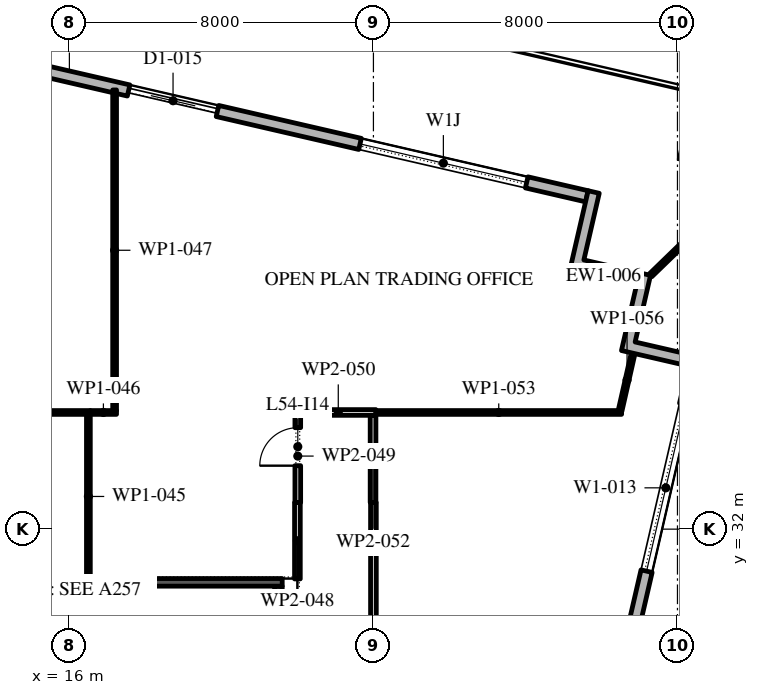
"""IFC4 building model, lengths in metres.
Left out: names, types, materials, properties, quantities, classifications, styles, units other than length and angle.
Written with IfcOpenShell. Run it as: python <this file> out.ifc"""

import sys

from ifc_helpers import new_model, si_unit, direction, frame, frame_2d, origin, place, context, subcontext, project, spatial, polyline, rectangle, outline, extrude, element, fill, save


model = new_model("IFC4")
c1 = context("Model", 3, precision=1e-05, world=origin(), true_north=direction((0.0, 1.0)))
c2 = subcontext(c1, "Body", "Model", "MODEL_VIEW")
j1 = project(units=[si_unit("LENGTHUNIT", "METRE"), si_unit("PLANEANGLEUNIT", "RADIAN")], contexts=[c1])
p1 = place(None, origin())
s1 = spatial("IfcSite", under=j1, at=p1, CompositionType="ELEMENT")
p2 = place(p1, origin())
s2 = spatial("IfcBuilding", under=s1, at=p2, CompositionType="ELEMENT")
p3 = place(p2, frame((0.0, 0.0, 251.4)))
s3 = spatial("IfcBuildingStorey", under=s2, at=p3, CompositionType="ELEMENT", Elevation=251.4)
p4 = place(p3, frame((21.359, -11.678, 0.0), z_axis=(0.0, 0.0, 1.0), x_axis=(0.224949198343, 0.974370493275, 0.0)))
e1 = element("IfcWall", 1, at=p4, inside=s3, PredefinedType="STANDARD", context=c2, shape_type="SweptSolid", body=[
    extrude(rectangle(XDim=49.5, YDim=0.3, at=frame_2d((24.75, 0.0))), origin(), (0.0, 0.0, 1.0), 4.0),
])
p5 = place(p4, frame((1.157, 0.0, 0.45)))
e2 = element("IfcOpeningElement", 2, at=p5, cuts=e1, PredefinedType="OPENING", context=c2, shape_type="SweptSolid", body=[
    extrude(rectangle(XDim=4.5, YDim=3.05, at=frame_2d((2.25, 1.525))), frame((0.0, 0.16, 0.0), z_axis=(0.0, -1.0, 0.0), x_axis=(1.0, 0.0, 0.0)), (0.0, 0.0, 1.0), 0.32),
])
p6 = place(p4, frame((8.121, 0.0, 0.45)))
e3 = element("IfcOpeningElement", 3, at=p6, cuts=e1, PredefinedType="OPENING", context=c2, shape_type="SweptSolid", body=[
    extrude(rectangle(XDim=4.5, YDim=3.05, at=frame_2d((2.25, 1.525))), frame((0.0, 0.16, 0.0), z_axis=(0.0, -1.0, 0.0), x_axis=(1.0, 0.0, 0.0)), (0.0, 0.0, 1.0), 0.32),
])
p7 = place(p4, frame((15.236, 0.0, 0.45)))
e4 = element("IfcOpeningElement", 4, at=p7, cuts=e1, PredefinedType="OPENING", context=c2, shape_type="SweptSolid", body=[
    extrude(rectangle(XDim=4.5, YDim=3.05, at=frame_2d((2.25, 1.525))), frame((0.0, 0.16, 0.0), z_axis=(0.0, -1.0, 0.0), x_axis=(1.0, 0.0, 0.0)), (0.0, 0.0, 1.0), 0.32),
])
p8 = place(p4, frame((22.35, 0.0, 0.45)))
e5 = element("IfcOpeningElement", 5, at=p8, cuts=e1, PredefinedType="OPENING", context=c2, shape_type="SweptSolid", body=[
    extrude(rectangle(XDim=4.5, YDim=3.05, at=frame_2d((2.25, 1.525))), frame((0.0, 0.16, 0.0), z_axis=(0.0, -1.0, 0.0), x_axis=(1.0, 0.0, 0.0)), (0.0, 0.0, 1.0), 0.32),
])
p9 = place(p4, frame((29.464, 0.0, 0.45)))
e6 = element("IfcOpeningElement", 6, at=p9, cuts=e1, PredefinedType="OPENING", context=c2, shape_type="SweptSolid", body=[
    extrude(rectangle(XDim=4.5, YDim=2.95, at=frame_2d((2.25, 1.475))), frame((0.0, 0.16, 0.0), z_axis=(0.0, -1.0, 0.0), x_axis=(1.0, 0.0, 0.0)), (0.0, 0.0, 1.0), 0.32),
])
p10 = place(p4, frame((37.628, 0.0, 0.0)))
e7 = element("IfcOpeningElement", 7, at=p10, cuts=e1, PredefinedType="OPENING", context=c2, shape_type="SweptSolid", body=[
    extrude(rectangle(XDim=2.4, YDim=3.325, at=frame_2d((1.2, 1.663))), frame((0.0, 0.16, 0.0), z_axis=(0.0, -1.0, 0.0), x_axis=(1.0, 0.0, 0.0)), (0.0, 0.0, 1.0), 0.32),
])
p11 = place(p4, frame((43.693, 0.0, 0.45)))
e8 = element("IfcOpeningElement", 8, at=p11, cuts=e1, PredefinedType="OPENING", context=c2, shape_type="SweptSolid", body=[
    extrude(rectangle(XDim=4.5, YDim=3.05, at=frame_2d((2.25, 1.525))), frame((0.0, 0.16, 0.0), z_axis=(0.0, -1.0, 0.0), x_axis=(1.0, 0.0, 0.0)), (0.0, 0.0, 1.0), 0.32),
])
p12 = place(p3, frame((29.616, 40.758, 0.0), z_axis=(0.0, 0.0, 1.0), x_axis=(-0.974370532314, 0.224949029246, 0.0)))
e9 = element("IfcWall", 9, at=p12, inside=s3, PredefinedType="STANDARD", context=c2, shape_type="SweptSolid", body=[
    extrude(rectangle(XDim=48.0, YDim=0.3, at=frame_2d((24.0, 0.0))), origin(), (0.0, 0.0, 1.0), 4.0),
])
p13 = place(p12, frame((1.625, 0.0, 0.45)))
e10 = element("IfcOpeningElement", 10, at=p13, cuts=e9, PredefinedType="OPENING", context=c2, shape_type="SweptSolid", body=[
    extrude(rectangle(XDim=4.5, YDim=2.675, at=frame_2d((2.25, 1.337))), frame((0.0, 0.16, 0.0), z_axis=(0.0, -1.0, 0.0), x_axis=(1.0, 0.0, 0.0)), (0.0, 0.0, 1.0), 0.32),
])
p14 = place(p12, frame((9.975, 0.0, 0.0)))
e11 = element("IfcOpeningElement", 11, at=p14, cuts=e9, PredefinedType="OPENING", context=c2, shape_type="SweptSolid", body=[
    extrude(rectangle(XDim=2.4, YDim=3.5, at=frame_2d((1.2, 1.75))), frame((0.0, 0.16, 0.0), z_axis=(0.0, -1.0, 0.0), x_axis=(1.0, 0.0, 0.0)), (0.0, 0.0, 1.0), 0.32),
])
p15 = place(p12, frame((17.575, 0.0, 0.45)))
e12 = element("IfcOpeningElement", 12, at=p15, cuts=e9, PredefinedType="OPENING", context=c2, shape_type="SweptSolid", body=[
    extrude(rectangle(XDim=4.5, YDim=2.525, at=frame_2d((2.25, 1.262))), frame((0.0, 0.16, 0.0), z_axis=(0.0, -1.0, 0.0), x_axis=(1.0, 0.0, 0.0)), (0.0, 0.0, 1.0), 0.32),
])
p16 = place(p12, frame((25.625, 0.0, 0.45)))
e13 = element("IfcOpeningElement", 13, at=p16, cuts=e9, PredefinedType="OPENING", context=c2, shape_type="SweptSolid", body=[
    extrude(rectangle(XDim=4.5, YDim=2.45, at=frame_2d((2.25, 1.225))), frame((0.0, 0.16, 0.0), z_axis=(0.0, -1.0, 0.0), x_axis=(1.0, 0.0, 0.0)), (0.0, 0.0, 1.0), 0.32),
])
p17 = place(p12, frame((33.675, 0.0, 0.45)))
e14 = element("IfcOpeningElement", 14, at=p17, cuts=e9, PredefinedType="OPENING", context=c2, shape_type="SweptSolid", body=[
    extrude(rectangle(XDim=4.5, YDim=2.45, at=frame_2d((2.25, 1.225))), frame((0.0, 0.16, 0.0), z_axis=(0.0, -1.0, 0.0), x_axis=(1.0, 0.0, 0.0)), (0.0, 0.0, 1.0), 0.32),
])
p18 = place(p12, frame((42.775, 0.0, 0.0)))
e15 = element("IfcOpeningElement", 15, at=p18, cuts=e9, PredefinedType="OPENING", context=c2, shape_type="SweptSolid", body=[
    extrude(rectangle(XDim=2.4, YDim=3.5, at=frame_2d((1.2, 1.75))), frame((0.0, 0.16, 0.0), z_axis=(0.0, -1.0, 0.0), x_axis=(1.0, 0.0, 0.0)), (0.0, 0.0, 1.0), 0.32),
])
p19 = place(p3, origin())
e16 = element("IfcWall", 16, at=p19, inside=s3, PredefinedType="STANDARD", context=c2, shape_type="SweptSolid", body=[
    extrude(outline(polyline([(30.931, 38.453), (29.177, 38.858), (29.65, 40.905), (29.942, 40.837), (29.537, 39.083), (31.291, 38.678), (30.886, 36.924), (32.348, 36.587), (32.28, 36.295), (30.526, 36.699), (30.931, 38.453)])), origin(), (0.0, 0.0, 1.0), 4.0),
])
p20 = place(p3, frame((31.291, 38.678, -0.05), z_axis=(0.0, 0.0, 1.0), x_axis=(0.718212839418, 0.695823481419, 0.0)))
e17 = element("IfcWall", 17, at=p20, inside=s3, PredefinedType="STANDARD", context=c2, shape_type="SweptSolid", body=[
    extrude(rectangle(XDim=3.62, YDim=0.1, at=frame_2d((1.81, 0.0))), origin(), (0.0, 0.0, 1.0), 4.05),
])
p21 = place(p3, frame((21.5, 25.75, 0.0), z_axis=(0.0, 0.0, 1.0), x_axis=(0.0, 1.0, 0.0)))
e18 = element("IfcWall", 18, at=p21, inside=s3, PredefinedType="SHEAR", context=c2, shape_type="SweptSolid", body=[
    extrude(rectangle(XDim=4.75, YDim=0.2, at=frame_2d((2.375, 0.0))), origin(), (0.0, 0.0, 1.0), 4.0),
])
p22 = place(p3, frame((10.4, 30.6, 0.0), z_axis=(0.0, 0.0, 1.0), x_axis=(1.0, 0.0, 0.0)))
e19 = element("IfcWall", 19, at=p22, inside=s3, PredefinedType="SHEAR", context=c2, shape_type="SweptSolid", body=[
    extrude(rectangle(XDim=11.2, YDim=0.2, at=frame_2d((5.6, 0.0))), origin(), (0.0, 0.0, 1.0), 4.0),
])
p23 = place(p3, frame((10.065, 35.07, 0.0), z_axis=(0.0, 0.0, 1.0), x_axis=(1.0, 0.0, 0.0)))
e20 = element("IfcWall", 20, at=p23, inside=s3, PredefinedType="PARTITIONING", context=c2, shape_type="SweptSolid", body=[
    extrude(rectangle(XDim=6.485, YDim=0.1, at=frame_2d((3.243, 0.0))), origin(), (0.0, 0.0, 1.0), 4.0),
])
p24 = place(p3, frame((16.5, 35.02, 0.0), z_axis=(0.0, 0.0, 1.0), x_axis=(0.0, -1.0, 0.0)))
e21 = element("IfcWall", 21, at=p24, inside=s3, PredefinedType="PARTITIONING", context=c2, shape_type="SweptSolid", body=[
    extrude(rectangle(XDim=4.32, YDim=0.1, at=frame_2d((2.16, 0.0))), origin(), (0.0, 0.0, 1.0), 4.0),
])
p25 = place(p3, frame((17.24, 35.07, 0.0), z_axis=(0.0, 0.0, 1.0), x_axis=(-1.0, 0.0, 0.0)))
e22 = element("IfcWall", 22, at=p25, inside=s3, PredefinedType="PARTITIONING", context=c2, shape_type="SweptSolid", body=[
    extrude(rectangle(XDim=0.69, YDim=0.1, at=frame_2d((0.345, 0.0))), origin(), (0.0, 0.0, 1.0), 4.0),
])
p26 = place(p3, frame((17.19, 43.556, 0.0), z_axis=(0.0, 0.0, 1.0), x_axis=(0.0, -1.0, 0.0)))
e23 = element("IfcWall", 23, at=p26, inside=s3, PredefinedType="PARTITIONING", context=c2, shape_type="SweptSolid", body=[
    extrude(rectangle(XDim=8.436, YDim=0.1, at=frame_2d((4.218, 0.0))), origin(), (0.0, 0.0, 1.0), 4.0),
])
p27 = place(p3, frame((22.0, 30.69, 0.0), z_axis=(0.0, 0.0, 1.0), x_axis=(0.0, 1.0, 0.0)))
e24 = element("IfcWall", 24, at=p27, inside=s3, PredefinedType="PARTITIONING", context=c2, shape_type="SweptSolid", body=[
    extrude(rectangle(XDim=2.01, YDim=0.15, at=frame_2d((1.005, 0.0))), origin(), (0.0, 0.0, 1.0), 4.0),
])
p28 = place(p3, frame((22.01, 32.7, 0.0), z_axis=(0.0, 0.0, 1.0), x_axis=(0.0, 1.0, 0.0)))
e25 = element("IfcWall", 25, at=p28, inside=s3, PredefinedType="PARTITIONING", context=c2, shape_type="SweptSolid", body=[
    extrude(rectangle(XDim=2.445, YDim=0.15, at=frame_2d((1.223, 0.0))), origin(), (0.0, 0.0, 1.0), 4.0),
])
p29 = place(p28, frame((0.97, 0.0, 0.0)))
e26 = element("IfcOpeningElement", 26, at=p29, cuts=e25, PredefinedType="OPENING", context=c2, shape_type="SweptSolid", body=[
    extrude(rectangle(XDim=1.0, YDim=2.1, at=frame_2d((0.5, 1.05))), frame((0.0, 0.085, 0.0), z_axis=(0.0, -1.0, 0.0), x_axis=(1.0, 0.0, 0.0)), (0.0, 0.0, 1.0), 0.17),
])
p30 = place(p3, frame((22.085, 35.07, 0.0), z_axis=(0.0, 0.0, 1.0), x_axis=(1.0, 0.0, 0.0)))
e27 = element("IfcWall", 27, at=p30, inside=s3, PredefinedType="PARTITIONING", context=c2, shape_type="SweptSolid", body=[
    extrude(rectangle(XDim=1.98, YDim=0.15, at=frame_2d((0.99, 0.0))), origin(), (0.0, 0.0, 1.0), 4.0),
])
p31 = place(p3, frame((23.99, 34.995, 0.0), z_axis=(0.0, 0.0, 1.0), x_axis=(0.0, -1.0, 0.0)))
e28 = element("IfcWall", 28, at=p31, inside=s3, PredefinedType="PARTITIONING", context=c2, shape_type="SweptSolid", body=[
    extrude(rectangle(XDim=2.295, YDim=0.15, at=frame_2d((1.147, 0.0))), origin(), (0.0, 0.0, 1.0), 4.0),
])
p32 = place(p3, frame((24.065, 35.07, 0.0), z_axis=(0.0, 0.0, 1.0), x_axis=(1.0, 0.0, 0.0)))
e29 = element("IfcWall", 29, at=p32, inside=s3, PredefinedType="PARTITIONING", context=c2, shape_type="SweptSolid", body=[
    extrude(rectangle(XDim=6.465, YDim=0.1, at=frame_2d((3.232, 0.0))), origin(), (0.0, 0.0, 1.0), 4.0),
])
p33 = place(p3, frame((24.0, 32.7, 0.0), z_axis=(0.0, 0.0, 1.0), x_axis=(0.0, -1.0, 0.0)))
e30 = element("IfcWall", 30, at=p33, inside=s3, PredefinedType="PARTITIONING", context=c2, shape_type="SweptSolid", body=[
    extrude(rectangle(XDim=28.905, YDim=0.15, at=frame_2d((14.453, 0.0))), origin(), (0.0, 0.0, 1.0), 4.0),
])
p34 = place(p33, frame((19.83, 0.0, 0.0)))
e31 = element("IfcOpeningElement", 31, at=p34, cuts=e30, PredefinedType="OPENING", context=c2, shape_type="SweptSolid", body=[
    extrude(rectangle(XDim=1.0, YDim=2.1, at=frame_2d((0.5, 1.05))), frame((0.0, 0.085, 0.0), z_axis=(0.0, -1.0, 0.0), x_axis=(1.0, 0.0, 0.0)), (0.0, 0.0, 1.0), 0.17),
])
p35 = place(p3, frame((30.491, 35.119, 0.0), z_axis=(0.0, 0.0, 1.0), x_axis=(0.221461033886, 0.975169221453, 0.0)))
e32 = element("IfcWall", 32, at=p35, inside=s3, PredefinedType="PARTITIONING", context=c2, shape_type="SweptSolid", body=[
    extrude(rectangle(XDim=1.648, YDim=0.1, at=frame_2d((0.824, 0.0))), origin(), (0.0, 0.0, 1.0), 4.0),
])
p36 = place(p11, origin())
e33 = element("IfcWindow", 33, at=p36, inside=s3, PartitioningType="DOUBLE_PANEL_VERTICAL", PredefinedType="WINDOW", context=c2, shape_type="SweptSolid", body=[
    extrude(rectangle(XDim=4.5, YDim=3.05, at=frame_2d((2.25, 1.525))), frame((0.0, 0.03, 0.0), z_axis=(0.0, -1.0, 0.0), x_axis=(1.0, 0.0, 0.0)), (0.0, 0.0, 1.0), 0.06),
])
fill(e8, e33)
p37 = place(p13, origin())
e34 = element("IfcWindow", 34, at=p37, inside=s3, PartitioningType="DOUBLE_PANEL_VERTICAL", PredefinedType="WINDOW", context=c2, shape_type="SweptSolid", body=[
    extrude(rectangle(XDim=4.5, YDim=2.675, at=frame_2d((2.25, 1.337))), frame((0.0, 0.03, 0.0), z_axis=(0.0, -1.0, 0.0), x_axis=(1.0, 0.0, 0.0)), (0.0, 0.0, 1.0), 0.06),
])
fill(e10, e34)
p38 = place(p14, origin())
e35 = element("IfcDoor", 35, at=p38, inside=s3, OperationType="DOUBLE_DOOR_SLIDING", PredefinedType="DOOR", context=c2, shape_type="SweptSolid", body=[
    extrude(rectangle(XDim=2.4, YDim=3.5, at=frame_2d((1.2, 1.75))), frame((0.0, 0.025, 0.0), z_axis=(0.0, -1.0, 0.0), x_axis=(1.0, 0.0, 0.0)), (0.0, 0.0, 1.0), 0.05),
])
fill(e11, e35)
p39 = place(p29, origin())
e36 = element("IfcDoor", 36, at=p39, inside=s3, OperationType="SINGLE_SWING_RIGHT", PredefinedType="DOOR", context=c2, shape_type="SweptSolid", body=[
    extrude(rectangle(XDim=1.0, YDim=2.1, at=frame_2d((0.5, 1.05))), frame((0.0, 0.025, 0.0), z_axis=(0.0, -1.0, 0.0), x_axis=(1.0, 0.0, 0.0)), (0.0, 0.0, 1.0), 0.05),
])
fill(e26, e36)
save(model, sys.argv[1])
